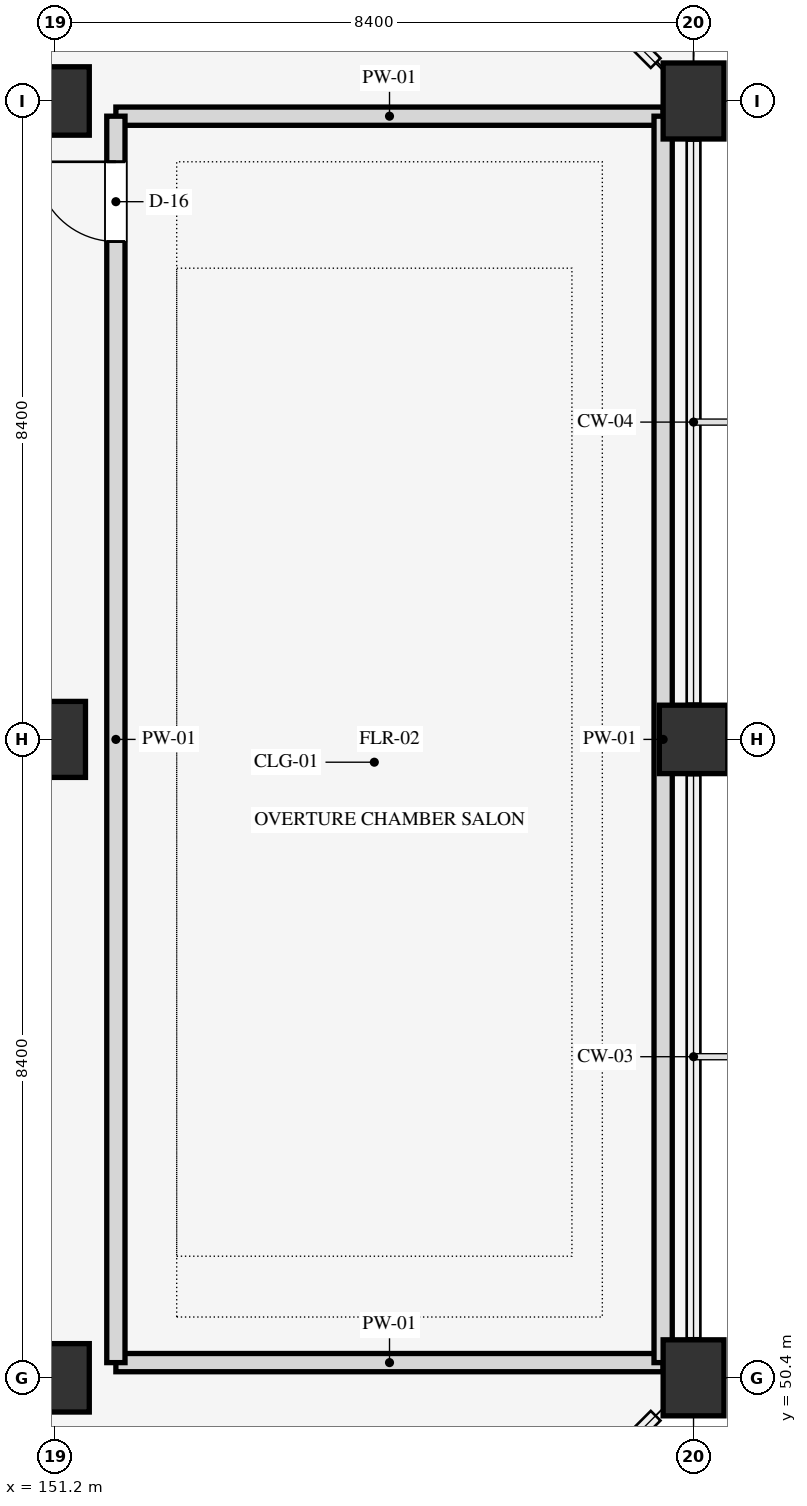
"""IFC4 building model, lengths in metres.
Left out: names, types, materials, properties, quantities, classifications, styles, units other than length and angle.
Written with IfcOpenShell. Run it as: python <this file> out.ifc"""

import sys

from ifc_helpers import new_model, si_unit, direction, frame, frame_2d, origin, origin_2d, place, context, subcontext, project, spatial, rectangle, extrude, element, fill, save


model = new_model("IFC4")
c1 = context("Model", 3, precision=1e-05, world=origin(), true_north=direction((0.0, 1.0)))
c2 = subcontext(c1, "Body", "Model", "MODEL_VIEW")
j1 = project(units=[si_unit("LENGTHUNIT", "METRE"), si_unit("PLANEANGLEUNIT", "RADIAN")], contexts=[c1])
p1 = place(None, origin())
s1 = spatial("IfcSite", under=j1, at=p1, CompositionType="ELEMENT")
p2 = place(p1, origin())
s2 = spatial("IfcBuilding", under=s1, at=p2, CompositionType="ELEMENT")
p3 = place(p2, frame((0.0, 0.0, 69.9)))
s3 = spatial("IfcBuildingStorey", under=s2, at=p3, CompositionType="ELEMENT", Elevation=69.9)
p4 = place(p3, frame((151.2, 50.4, 0.0), z_axis=(0.0, 0.0, 1.0), x_axis=(1.0, 0.0, 0.0)))
e1 = element("IfcColumn", 1, at=p4, inside=s3, PredefinedType="COLUMN", context=c2, shape_type="SweptSolid", body=[
    extrude(rectangle(XDim=0.9, YDim=0.9, at=origin_2d()), origin(), (0.0, 0.0, 1.0), 4.5),
])
p5 = place(p3, frame((151.2, 58.8, 0.0), z_axis=(0.0, 0.0, 1.0), x_axis=(1.0, 0.0, 0.0)))
e2 = element("IfcColumn", 2, at=p5, inside=s3, PredefinedType="COLUMN", context=c2, shape_type="SweptSolid", body=[
    extrude(rectangle(XDim=0.8, YDim=1.0, at=origin_2d()), origin(), (0.0, 0.0, 1.0), 4.5),
])
p6 = place(p3, frame((151.2, 67.2, 0.0), z_axis=(0.0, 0.0, 1.0), x_axis=(1.0, 0.0, 0.0)))
e3 = element("IfcColumn", 3, at=p6, inside=s3, PredefinedType="COLUMN", context=c2, shape_type="SweptSolid", body=[
    extrude(rectangle(XDim=0.9, YDim=0.9, at=origin_2d()), origin(), (0.0, 0.0, 1.0), 4.5),
])
p7 = place(p3, frame((159.6, 50.4, 0.0), z_axis=(0.0, 0.0, 1.0), x_axis=(1.0, 0.0, 0.0)))
e4 = element("IfcColumn", 4, at=p7, inside=s3, PredefinedType="COLUMN", context=c2, shape_type="SweptSolid", body=[
    extrude(rectangle(XDim=0.8, YDim=1.0, at=origin_2d()), origin(), (0.0, 0.0, 1.0), 4.5),
])
p8 = place(p3, frame((159.6, 58.8, 0.0), z_axis=(0.0, 0.0, 1.0), x_axis=(1.0, 0.0, 0.0)))
e5 = element("IfcColumn", 5, at=p8, inside=s3, PredefinedType="COLUMN", context=c2, shape_type="SweptSolid", body=[
    extrude(rectangle(XDim=0.9, YDim=0.9, at=origin_2d()), origin(), (0.0, 0.0, 1.0), 4.5),
])
p9 = place(p3, frame((159.6, 67.2, 0.0), z_axis=(0.0, 0.0, 1.0), x_axis=(1.0, 0.0, 0.0)))
e6 = element("IfcColumn", 6, at=p9, inside=s3, PredefinedType="COLUMN", context=c2, shape_type="SweptSolid", body=[
    extrude(rectangle(XDim=0.8, YDim=1.0, at=origin_2d()), origin(), (0.0, 0.0, 1.0), 4.5),
])
for number, where, z_axis, x_axis in (
    (7, (152.0, 50.6, 0.0), (0.0, 0.0, 1.0), (1.0, 0.0, 0.0)),
    (8, (152.0, 67.0, 0.0), (0.0, 0.0, 1.0), (1.0, 0.0, 0.0)),
):
    element("IfcWall", number, at=place(p3, frame(where, z_axis=z_axis, x_axis=x_axis)), inside=s3, PredefinedType="PARTITIONING", context=c2, shape_type="SweptSolid", body=[
        extrude(rectangle(XDim=7.2, YDim=0.24, at=frame_2d((3.6, 0.0))), origin(), (0.0, 0.0, 1.0), 3.54),
    ])
p10 = place(p3, frame((152.0, 50.6, 0.0), z_axis=(0.0, 0.0, 1.0), x_axis=(0.0, 1.0, 0.0)))
e9 = element("IfcWall", 9, at=p10, inside=s3, PredefinedType="PARTITIONING", context=c2, shape_type="SweptSolid", body=[
    extrude(rectangle(XDim=16.4, YDim=0.24, at=frame_2d((8.2, 0.0))), origin(), (0.0, 0.0, 1.0), 3.54),
])
p11 = place(p10, frame((14.75, 0.0, 0.0)))
e10 = element("IfcOpeningElement", 10, at=p11, cuts=e9, PredefinedType="OPENING", context=c2, shape_type="SweptSolid", body=[
    extrude(rectangle(XDim=1.05, YDim=2.16, at=frame_2d((0.525, 1.08))), frame((0.0, 0.13, 0.0), z_axis=(0.0, -1.0, 0.0), x_axis=(1.0, 0.0, 0.0)), (0.0, 0.0, 1.0), 0.26),
])
p12 = place(p3, frame((159.2, 50.6, 0.0), z_axis=(0.0, 0.0, 1.0), x_axis=(0.0, 1.0, 0.0)))
e11 = element("IfcWall", 11, at=p12, inside=s3, PredefinedType="PARTITIONING", context=c2, shape_type="SweptSolid", body=[
    extrude(rectangle(XDim=16.4, YDim=0.24, at=frame_2d((8.2, 0.0))), origin(), (0.0, 0.0, 1.0), 3.54),
])
p13 = place(p11, origin())
e12 = element("IfcDoor", 12, at=p13, inside=s3, OperationType="SINGLE_SWING_RIGHT", PredefinedType="DOOR", context=c2, shape_type="SweptSolid", body=[
    extrude(rectangle(XDim=1.05, YDim=2.16, at=frame_2d((0.525, 1.08))), frame((0.0, 0.025, 0.0), z_axis=(0.0, -1.0, 0.0), x_axis=(1.0, 0.0, 0.0)), (0.0, 0.0, 1.0), 0.05),
])
fill(e10, e12)
save(model, sys.argv[1])
